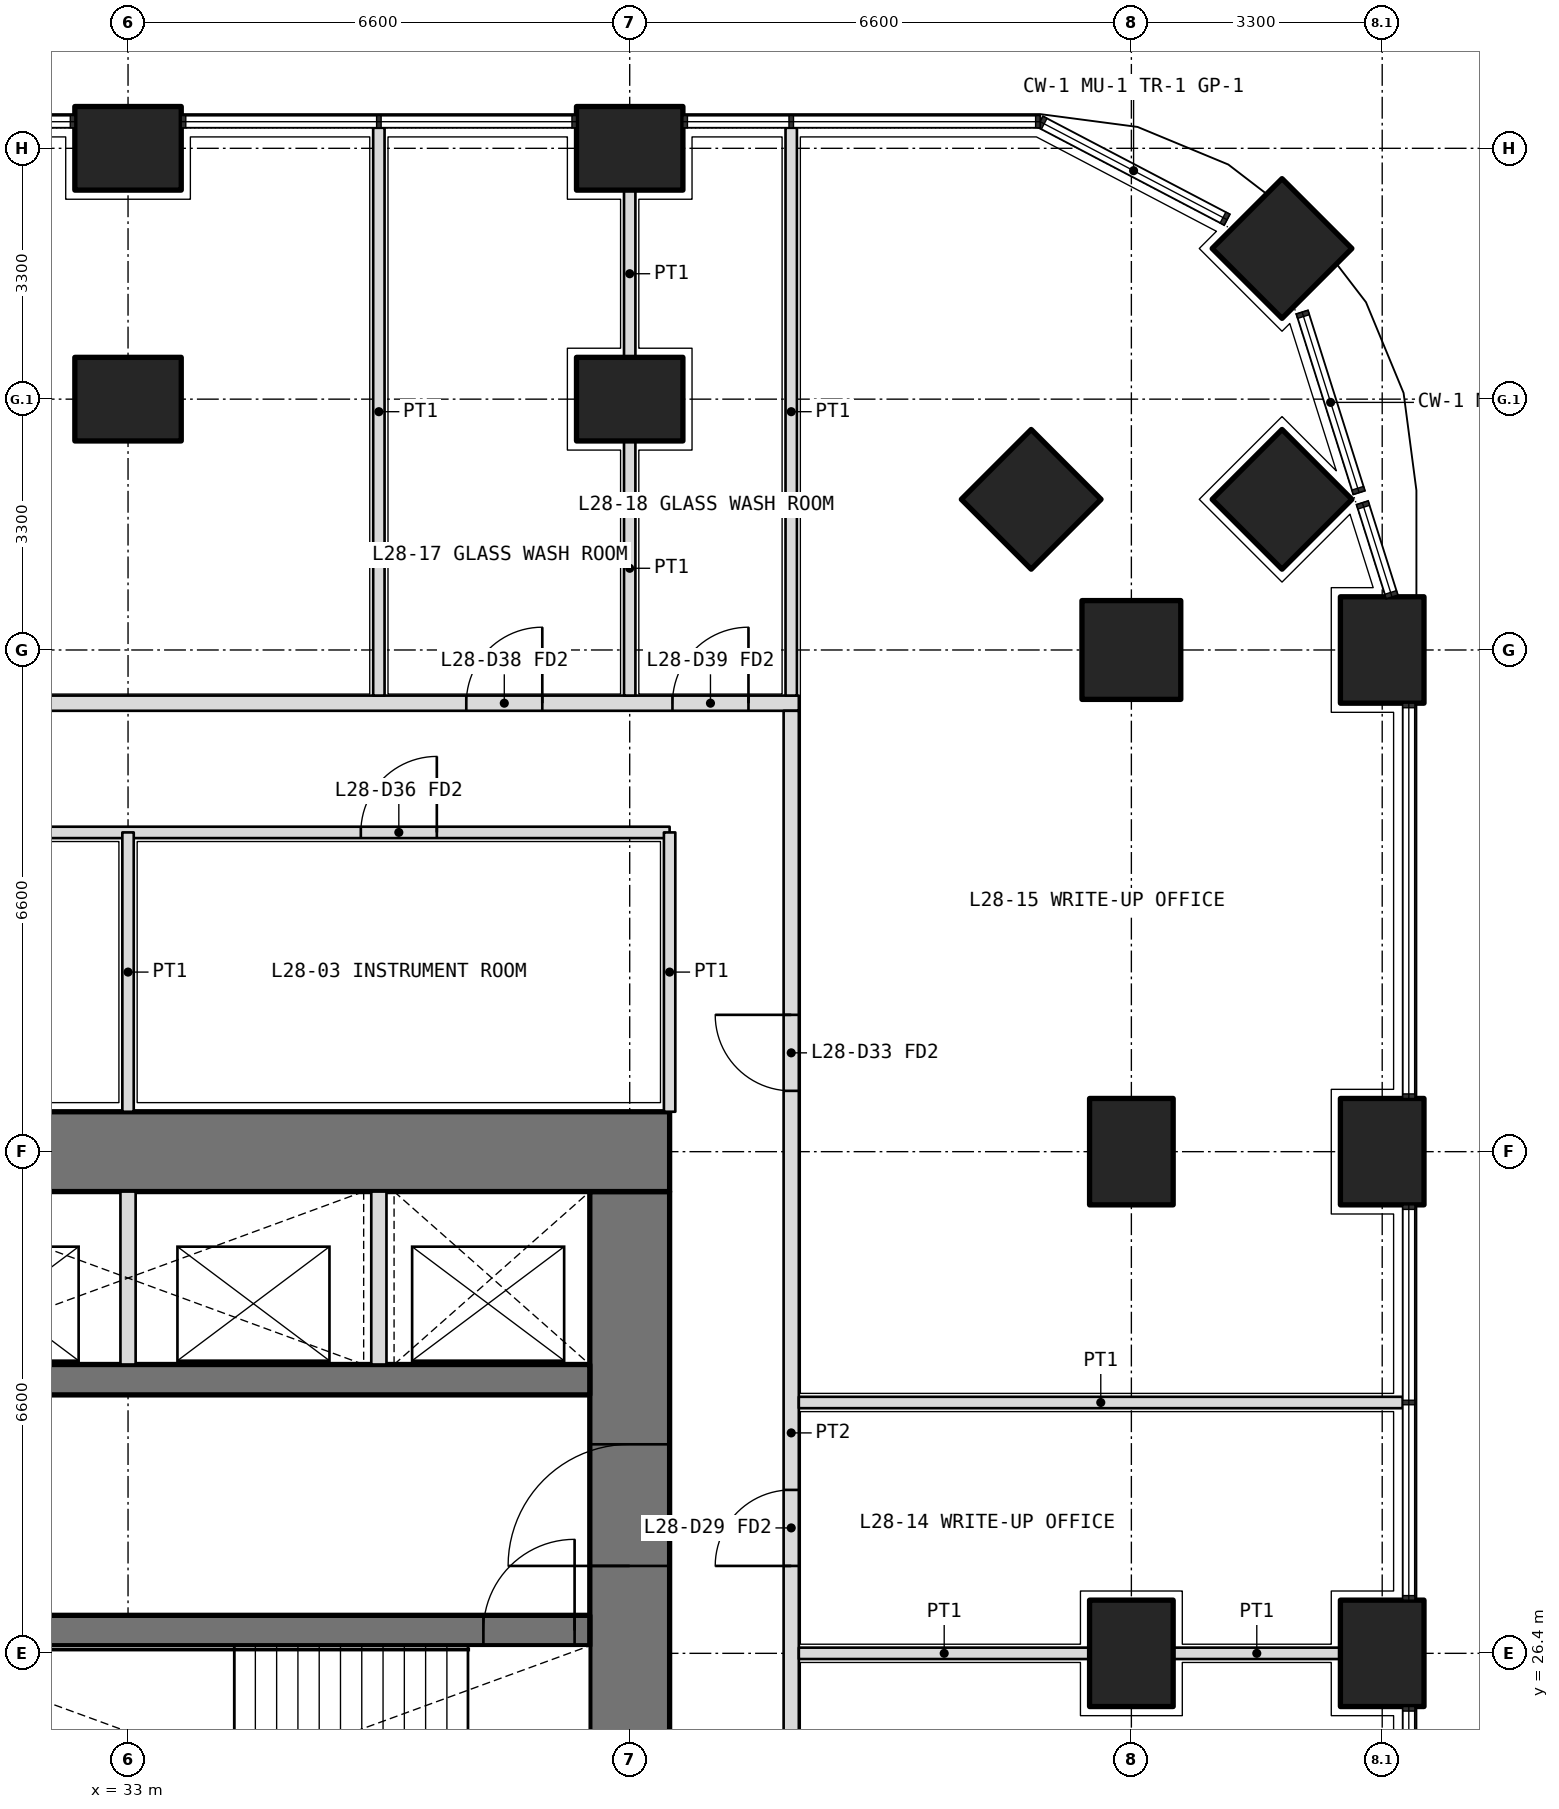
"""IFC4 building model, lengths in metres.
Left out: names, types, materials, properties, quantities, classifications, styles, units other than length and angle.
Written with IfcOpenShell. Run it as: python <this file> out.ifc"""

import sys

from ifc_helpers import new_model, si_unit, direction, frame, frame_2d, origin, origin_2d, place, context, subcontext, project, spatial, rectangle, extrude, element, fill, save


model = new_model("IFC4")
c1 = context("Model", 3, precision=1e-05, world=origin(), true_north=direction((0.0, 1.0)))
c2 = subcontext(c1, "Body", "Model", "MODEL_VIEW")
j1 = project(units=[si_unit("LENGTHUNIT", "METRE"), si_unit("PLANEANGLEUNIT", "RADIAN")], contexts=[c1])
p1 = place(None, origin())
s1 = spatial("IfcSite", under=j1, at=p1, CompositionType="ELEMENT")
p2 = place(p1, origin())
s2 = spatial("IfcBuilding", under=s1, at=p2, CompositionType="ELEMENT")
p3 = place(p2, frame((0.0, 0.0, 124.2)))
s3 = spatial("IfcBuildingStorey", under=s2, at=p3, CompositionType="ELEMENT", Elevation=124.2)
p4 = place(p3, frame((48.182, 44.882, 0.0), z_axis=(0.0, 0.0, 1.0), x_axis=(0.707106781187, 0.707106781187, 0.0)))
e1 = element("IfcColumn", 1, at=p4, inside=s3, PredefinedType="COLUMN", context=c2, shape_type="SweptSolid", body=[
    extrude(rectangle(XDim=1.3, YDim=1.3, at=origin_2d()), origin(), (0.0, 0.0, 1.0), 4.2),
])
for number, where, z_axis, x_axis in (
    (2, (49.5, 26.4, 0.0), (0.0, 0.0, 1.0), (0.0, 1.0, 0.0)),
    (3, (49.5, 33.0, 0.0), (0.0, 0.0, 1.0), (0.0, 1.0, 0.0)),
    (4, (49.5, 39.6, 0.0), (0.0, 0.0, 1.0), (0.0, 1.0, 0.0)),
    (5, (33.0, 46.2, 0.0), (0.0, 0.0, 1.0), (1.0, 0.0, 0.0)),
    (6, (39.6, 46.2, 0.0), (0.0, 0.0, 1.0), (1.0, 0.0, 0.0)),
):
    element("IfcColumn", number, at=place(p3, frame(where, z_axis=z_axis, x_axis=x_axis)), inside=s3, PredefinedType="COLUMN", context=c2, shape_type="SweptSolid", body=[
        extrude(rectangle(XDim=1.4, YDim=1.1, at=origin_2d()), origin(), (0.0, 0.0, 1.0), 4.2),
    ])
for number, where, z_axis, x_axis in (
    (7, (46.2, 39.6, 0.0), (0.0, 0.0, 1.0), (1.0, 0.0, 0.0)),
    (8, (48.182, 41.582, 0.0), (0.0, 0.0, 1.0), (0.707, 0.707, 0.0)),
):
    element("IfcColumn", number, at=place(p3, frame(where, z_axis=z_axis, x_axis=x_axis)), inside=s3, PredefinedType="COLUMN", context=c2, shape_type="SweptSolid", body=[
        extrude(rectangle(XDim=1.3, YDim=1.3, at=origin_2d()), origin(), (0.0, 0.0, 1.0), 4.2),
    ])
for number, where, z_axis, x_axis in (
    (9, (33.0, 42.9, 0.0), (0.0, 0.0, 1.0), (1.0, 0.0, 0.0)),
    (10, (39.6, 42.9, 0.0), (0.0, 0.0, 1.0), (1.0, 0.0, 0.0)),
):
    element("IfcColumn", number, at=place(p3, frame(where, z_axis=z_axis, x_axis=x_axis)), inside=s3, PredefinedType="COLUMN", context=c2, shape_type="SweptSolid", body=[
        extrude(rectangle(XDim=1.4, YDim=1.1, at=origin_2d()), origin(), (0.0, 0.0, 1.0), 4.2),
    ])
p5 = place(p3, frame((44.882, 41.582, 0.0), z_axis=(0.0, 0.0, 1.0), x_axis=(0.707106781187, 0.707106781187, 0.0)))
e11 = element("IfcColumn", 11, at=p5, inside=s3, PredefinedType="COLUMN", context=c2, shape_type="SweptSolid", body=[
    extrude(rectangle(XDim=1.3, YDim=1.3, at=origin_2d()), origin(), (0.0, 0.0, 1.0), 4.2),
])
for number, where, z_axis, x_axis in (
    (12, (46.2, 26.4, 0.0), (0.0, 0.0, 1.0), (0.0, 1.0, 0.0)),
    (13, (46.2, 33.0, 0.0), (0.0, 0.0, 1.0), (0.0, 1.0, 0.0)),
):
    element("IfcColumn", number, at=place(p3, frame(where, z_axis=z_axis, x_axis=x_axis)), inside=s3, PredefinedType="COLUMN", context=c2, shape_type="SweptSolid", body=[
        extrude(rectangle(XDim=1.4, YDim=1.1, at=origin_2d()), origin(), (0.0, 0.0, 1.0), 4.2),
    ])
p6 = place(p3, frame((39.6, 13.725, 0.0), z_axis=(0.0, 0.0, 1.0), x_axis=(0.0, 1.0, 0.0)))
e14 = element("IfcWall", 14, at=p6, inside=s3, PredefinedType="SHEAR", context=c2, shape_type="SweptSolid", body=[
    extrude(rectangle(XDim=18.75, YDim=1.05, at=frame_2d((9.375, 0.0))), origin(), (0.0, 0.0, 1.0), 4.2),
])
p7 = place(p6, frame((3.025, 0.0, 0.0)))
e15 = element("IfcOpeningElement", 15, at=p7, cuts=e14, PredefinedType="OPENING", context=c2, shape_type="SweptSolid", body=[
    extrude(rectangle(XDim=1.6, YDim=2.1, at=frame_2d((0.8, 1.05))), frame((0.0, 0.535, 0.0), z_axis=(0.0, -1.0, 0.0), x_axis=(1.0, 0.0, 0.0)), (0.0, 0.0, 1.0), 1.07),
])
p8 = place(p6, frame((13.825, 0.0, 0.0)))
e16 = element("IfcOpeningElement", 16, at=p8, cuts=e14, PredefinedType="OPENING", context=c2, shape_type="SweptSolid", body=[
    extrude(rectangle(XDim=1.6, YDim=2.1, at=frame_2d((0.8, 1.05))), frame((0.0, 0.535, 0.0), z_axis=(0.0, -1.0, 0.0), x_axis=(1.0, 0.0, 0.0)), (0.0, 0.0, 1.0), 1.07),
])
p9 = place(p3, frame((40.125, 33.0, 0.0), z_axis=(0.0, 0.0, 1.0), x_axis=(-1.0, 0.0, 0.0)))
e17 = element("IfcWall", 17, at=p9, inside=s3, PredefinedType="SHEAR", context=c2, shape_type="SweptSolid", body=[
    extrude(rectangle(XDim=27.45, YDim=1.05, at=frame_2d((13.725, 0.0))), origin(), (0.0, 0.0, 1.0), 4.2),
])
p10 = place(p3, frame((13.725, 26.7, 0.0), z_axis=(0.0, 0.0, 1.0), x_axis=(1.0, 0.0, 0.0)))
e18 = element("IfcWall", 18, at=p10, inside=s3, PredefinedType="SHEAR", context=c2, shape_type="SweptSolid", body=[
    extrude(rectangle(XDim=25.35, YDim=0.4, at=frame_2d((12.675, 0.0))), origin(), (0.0, 0.0, 1.0), 4.2),
])
p11 = place(p10, frame((23.95, 0.0, 0.0)))
e19 = element("IfcOpeningElement", 19, at=p11, cuts=e18, PredefinedType="OPENING", context=c2, shape_type="SweptSolid", body=[
    extrude(rectangle(XDim=1.2, YDim=2.1, at=frame_2d((0.6, 1.05))), frame((0.0, 0.21, 0.0), z_axis=(0.0, -1.0, 0.0), x_axis=(1.0, 0.0, 0.0)), (0.0, 0.0, 1.0), 0.42),
])
p12 = place(p10, frame((0.738, 0.0, 0.0)))
e20 = element("IfcOpeningElement", 20, at=p12, cuts=e18, PredefinedType="OPENING", context=c2, shape_type="SweptSolid", body=[
    extrude(rectangle(XDim=1.1, YDim=2.1, at=frame_2d((0.55, 1.05))), frame((0.0, 0.21, 0.0), z_axis=(0.0, -1.0, 0.0), x_axis=(1.0, 0.0, 0.0)), (0.0, 0.0, 1.0), 0.42),
])
p13 = place(p10, frame((3.925, 0.0, 0.0)))
e21 = element("IfcOpeningElement", 21, at=p13, cuts=e18, PredefinedType="OPENING", context=c2, shape_type="SweptSolid", body=[
    extrude(rectangle(XDim=1.1, YDim=2.1, at=frame_2d((0.55, 1.05))), frame((0.0, 0.21, 0.0), z_axis=(0.0, -1.0, 0.0), x_axis=(1.0, 0.0, 0.0)), (0.0, 0.0, 1.0), 0.42),
])
p14 = place(p10, frame((7.175, 0.0, 0.0)))
e22 = element("IfcOpeningElement", 22, at=p14, cuts=e18, PredefinedType="OPENING", context=c2, shape_type="SweptSolid", body=[
    extrude(rectangle(XDim=1.1, YDim=2.1, at=frame_2d((0.55, 1.05))), frame((0.0, 0.21, 0.0), z_axis=(0.0, -1.0, 0.0), x_axis=(1.0, 0.0, 0.0)), (0.0, 0.0, 1.0), 0.42),
])
p15 = place(p10, frame((10.425, 0.0, 0.0)))
e23 = element("IfcOpeningElement", 23, at=p15, cuts=e18, PredefinedType="OPENING", context=c2, shape_type="SweptSolid", body=[
    extrude(rectangle(XDim=1.1, YDim=2.1, at=frame_2d((0.55, 1.05))), frame((0.0, 0.21, 0.0), z_axis=(0.0, -1.0, 0.0), x_axis=(1.0, 0.0, 0.0)), (0.0, 0.0, 1.0), 0.42),
])
p16 = place(p10, frame((13.775, 0.0, 0.0)))
e24 = element("IfcOpeningElement", 24, at=p16, cuts=e18, PredefinedType="OPENING", context=c2, shape_type="SweptSolid", body=[
    extrude(rectangle(XDim=1.1, YDim=2.1, at=frame_2d((0.55, 1.05))), frame((0.0, 0.21, 0.0), z_axis=(0.0, -1.0, 0.0), x_axis=(1.0, 0.0, 0.0)), (0.0, 0.0, 1.0), 0.42),
])
p17 = place(p3, frame((13.725, 30.0, 0.0), z_axis=(0.0, 0.0, 1.0), x_axis=(1.0, 0.0, 0.0)))
e25 = element("IfcWall", 25, at=p17, inside=s3, PredefinedType="SHEAR", context=c2, shape_type="SweptSolid", body=[
    extrude(rectangle(XDim=25.35, YDim=0.4, at=frame_2d((12.675, 0.0))), origin(), (0.0, 0.0, 1.0), 4.2),
])
for number, where, z_axis, x_axis in (
    (26, (33.0, 30.2, 0.0), (0.0, 0.0, 1.0), (0.0, 1.0, 0.0)),
    (27, (36.3, 30.2, 0.0), (0.0, 0.0, 1.0), (0.0, 1.0, 0.0)),
):
    element("IfcWall", number, at=place(p3, frame(where, z_axis=z_axis, x_axis=x_axis)), inside=s3, PredefinedType="PARTITIONING", context=c2, shape_type="SweptSolid", body=[
        extrude(rectangle(XDim=2.275, YDim=0.2, at=frame_2d((1.138, 0.0))), origin(), (0.0, 0.0, 1.0), 4.2),
    ])
p18 = place(p3, frame((12.675, 37.2, 0.0), z_axis=(0.0, 0.0, 1.0), x_axis=(1.0, 0.0, 0.0)))
e28 = element("IfcWall", 28, at=p18, inside=s3, PredefinedType="PARTITIONING", context=c2, shape_type="SweptSolid", body=[
    extrude(rectangle(XDim=27.45, YDim=0.15, at=frame_2d((13.725, 0.0))), origin(), (0.0, 0.0, 1.0), 2.85),
])
p19 = place(p18, frame((3.062, 0.0, 0.0)))
e29 = element("IfcOpeningElement", 29, at=p19, cuts=e28, PredefinedType="OPENING", context=c2, shape_type="SweptSolid", body=[
    extrude(rectangle(XDim=1.0, YDim=2.1, at=frame_2d((0.5, 1.05))), frame((0.0, 0.085, 0.0), z_axis=(0.0, -1.0, 0.0), x_axis=(1.0, 0.0, 0.0)), (0.0, 0.0, 1.0), 0.17),
])
p20 = place(p18, frame((13.225, 0.0, 0.0)))
e30 = element("IfcOpeningElement", 30, at=p20, cuts=e28, PredefinedType="OPENING", context=c2, shape_type="SweptSolid", body=[
    extrude(rectangle(XDim=1.0, YDim=2.1, at=frame_2d((0.5, 1.05))), frame((0.0, 0.085, 0.0), z_axis=(0.0, -1.0, 0.0), x_axis=(1.0, 0.0, 0.0)), (0.0, 0.0, 1.0), 0.17),
])
p21 = place(p18, frame((23.387, 0.0, 0.0)))
e31 = element("IfcOpeningElement", 31, at=p21, cuts=e28, PredefinedType="OPENING", context=c2, shape_type="SweptSolid", body=[
    extrude(rectangle(XDim=1.0, YDim=2.1, at=frame_2d((0.5, 1.05))), frame((0.0, 0.085, 0.0), z_axis=(0.0, -1.0, 0.0), x_axis=(1.0, 0.0, 0.0)), (0.0, 0.0, 1.0), 0.17),
])
for number, where, z_axis, x_axis in (
    (32, (40.125, 33.525, 0.0), (0.0, 0.0, 1.0), (0.0, 1.0, 0.0)),
    (33, (33.0, 33.525, 0.0), (0.0, 0.0, 1.0), (0.0, 1.0, 0.0)),
):
    element("IfcWall", number, at=place(p3, frame(where, z_axis=z_axis, x_axis=x_axis)), inside=s3, PredefinedType="PARTITIONING", context=c2, shape_type="SweptSolid", body=[
        extrude(rectangle(XDim=3.675, YDim=0.15, at=frame_2d((1.837, 0.0))), origin(), (0.0, 0.0, 1.0), 2.85),
    ])
p22 = place(p3, frame((10.975, 38.9, 0.0), z_axis=(0.0, 0.0, 1.0), x_axis=(1.0, 0.0, 0.0)))
e34 = element("IfcWall", 34, at=p22, inside=s3, PredefinedType="PARTITIONING", context=c2, shape_type="SweptSolid", body=[
    extrude(rectangle(XDim=30.85, YDim=0.2, at=frame_2d((15.425, 0.0))), origin(), (0.0, 0.0, 1.0), 2.85),
])
p23 = place(p22, frame((12.113, 0.0, 0.0)))
e35 = element("IfcOpeningElement", 35, at=p23, cuts=e34, PredefinedType="OPENING", context=c2, shape_type="SweptSolid", body=[
    extrude(rectangle(XDim=1.2, YDim=2.1, at=frame_2d((0.6, 1.05))), frame((0.0, 0.11, 0.0), z_axis=(0.0, -1.0, 0.0), x_axis=(1.0, 0.0, 0.0)), (0.0, 0.0, 1.0), 0.22),
])
p24 = place(p22, frame((26.475, 0.0, 0.0)))
e36 = element("IfcOpeningElement", 36, at=p24, cuts=e34, PredefinedType="OPENING", context=c2, shape_type="SweptSolid", body=[
    extrude(rectangle(XDim=1.0, YDim=2.1, at=frame_2d((0.5, 1.05))), frame((0.0, 0.11, 0.0), z_axis=(0.0, -1.0, 0.0), x_axis=(1.0, 0.0, 0.0)), (0.0, 0.0, 1.0), 0.22),
])
p25 = place(p22, frame((29.188, 0.0, 0.0)))
e37 = element("IfcOpeningElement", 37, at=p25, cuts=e34, PredefinedType="OPENING", context=c2, shape_type="SweptSolid", body=[
    extrude(rectangle(XDim=1.0, YDim=2.1, at=frame_2d((0.5, 1.05))), frame((0.0, 0.11, 0.0), z_axis=(0.0, -1.0, 0.0), x_axis=(1.0, 0.0, 0.0)), (0.0, 0.0, 1.0), 0.22),
])
p26 = place(p3, frame((41.725, 19.8, 0.0), z_axis=(0.0, 0.0, 1.0), x_axis=(0.0, 1.0, 0.0)))
e38 = element("IfcWall", 38, at=p26, inside=s3, PredefinedType="PARTITIONING", context=c2, shape_type="SweptSolid", body=[
    extrude(rectangle(XDim=19.0, YDim=0.2, at=frame_2d((9.5, 0.0))), origin(), (0.0, 0.0, 1.0), 2.85),
])
p27 = place(p26, frame((1.0, 0.0, 0.0)))
e39 = element("IfcOpeningElement", 39, at=p27, cuts=e38, PredefinedType="OPENING", context=c2, shape_type="SweptSolid", body=[
    extrude(rectangle(XDim=1.0, YDim=2.1, at=frame_2d((0.5, 1.05))), frame((0.0, 0.11, 0.0), z_axis=(0.0, -1.0, 0.0), x_axis=(1.0, 0.0, 0.0)), (0.0, 0.0, 1.0), 0.22),
])
p28 = place(p26, frame((4.35, 0.0, 0.0)))
e40 = element("IfcOpeningElement", 40, at=p28, cuts=e38, PredefinedType="OPENING", context=c2, shape_type="SweptSolid", body=[
    extrude(rectangle(XDim=0.9, YDim=2.1, at=frame_2d((0.45, 1.05))), frame((0.0, 0.11, 0.0), z_axis=(0.0, -1.0, 0.0), x_axis=(1.0, 0.0, 0.0)), (0.0, 0.0, 1.0), 0.22),
])
p29 = place(p26, frame((7.75, 0.0, 0.0)))
e41 = element("IfcOpeningElement", 41, at=p29, cuts=e38, PredefinedType="OPENING", context=c2, shape_type="SweptSolid", body=[
    extrude(rectangle(XDim=1.0, YDim=2.1, at=frame_2d((0.5, 1.05))), frame((0.0, 0.11, 0.0), z_axis=(0.0, -1.0, 0.0), x_axis=(1.0, 0.0, 0.0)), (0.0, 0.0, 1.0), 0.22),
])
p30 = place(p26, frame((14.0, 0.0, 0.0)))
e42 = element("IfcOpeningElement", 42, at=p30, cuts=e38, PredefinedType="OPENING", context=c2, shape_type="SweptSolid", body=[
    extrude(rectangle(XDim=1.0, YDim=2.1, at=frame_2d((0.5, 1.05))), frame((0.0, 0.11, 0.0), z_axis=(0.0, -1.0, 0.0), x_axis=(1.0, 0.0, 0.0)), (0.0, 0.0, 1.0), 0.22),
])
p31 = place(p3, frame((41.725, 46.47, 0.0), z_axis=(0.0, 0.0, 1.0), x_axis=(0.0, -1.0, 0.0)))
e43 = element("IfcWall", 43, at=p31, inside=s3, PredefinedType="PARTITIONING", context=c2, shape_type="SweptSolid", body=[
    extrude(rectangle(XDim=7.47, YDim=0.15, at=frame_2d((3.735, 0.0))), origin(), (0.0, 0.0, 1.0), 2.7),
])
p32 = place(p3, frame((48.95, 26.4, 0.0), z_axis=(0.0, 0.0, 1.0), x_axis=(-1.0, 0.0, 0.0)))
e44 = element("IfcWall", 44, at=p32, inside=s3, PredefinedType="PARTITIONING", context=c2, shape_type="SweptSolid", body=[
    extrude(rectangle(XDim=2.2, YDim=0.15, at=frame_2d((1.1, 0.0))), origin(), (0.0, 0.0, 1.0), 2.85),
])
p33 = place(p3, frame((45.65, 26.4, 0.0), z_axis=(0.0, 0.0, 1.0), x_axis=(-1.0, 0.0, 0.0)))
e45 = element("IfcWall", 45, at=p33, inside=s3, PredefinedType="PARTITIONING", context=c2, shape_type="SweptSolid", body=[
    extrude(rectangle(XDim=3.825, YDim=0.15, at=frame_2d((1.913, 0.0))), origin(), (0.0, 0.0, 1.0), 2.85),
])
p34 = place(p3, frame((49.77, 29.7, 0.0), z_axis=(0.0, 0.0, 1.0), x_axis=(-1.0, 0.0, 0.0)))
e46 = element("IfcWall", 46, at=p34, inside=s3, PredefinedType="PARTITIONING", context=c2, shape_type="SweptSolid", body=[
    extrude(rectangle(XDim=7.945, YDim=0.15, at=frame_2d((3.973, 0.0))), origin(), (0.0, 0.0, 1.0), 2.7),
])
p35 = place(p3, frame((36.3, 46.47, 0.0), z_axis=(0.0, 0.0, 1.0), x_axis=(0.0, -1.0, 0.0)))
e47 = element("IfcWall", 47, at=p35, inside=s3, PredefinedType="PARTITIONING", context=c2, shape_type="SweptSolid", body=[
    extrude(rectangle(XDim=7.47, YDim=0.15, at=frame_2d((3.735, 0.0))), origin(), (0.0, 0.0, 1.0), 2.7),
])
p36 = place(p3, frame((39.6, 45.65, 0.0), z_axis=(0.0, 0.0, 1.0), x_axis=(0.0, -1.0, 0.0)))
e48 = element("IfcWall", 48, at=p36, inside=s3, PredefinedType="PARTITIONING", context=c2, shape_type="SweptSolid", body=[
    extrude(rectangle(XDim=2.2, YDim=0.15, at=frame_2d((1.1, 0.0))), origin(), (0.0, 0.0, 1.0), 2.85),
])
p37 = place(p3, frame((39.6, 42.35, 0.0), z_axis=(0.0, 0.0, 1.0), x_axis=(0.0, -1.0, 0.0)))
e49 = element("IfcWall", 49, at=p37, inside=s3, PredefinedType="PARTITIONING", context=c2, shape_type="SweptSolid", body=[
    extrude(rectangle(XDim=3.35, YDim=0.15, at=frame_2d((1.675, 0.0))), origin(), (0.0, 0.0, 1.0), 2.85),
])
p38 = place(p21, origin())
e50 = element("IfcDoor", 50, at=p38, inside=s3, OperationType="SINGLE_SWING_RIGHT", PredefinedType="DOOR", context=c2, shape_type="SweptSolid", body=[
    extrude(rectangle(XDim=1.0, YDim=2.1, at=frame_2d((0.5, 1.05))), frame((0.0, 0.025, 0.0), z_axis=(0.0, -1.0, 0.0), x_axis=(1.0, 0.0, 0.0)), (0.0, 0.0, 1.0), 0.05),
])
fill(e31, e50)
p39 = place(p29, origin())
e51 = element("IfcDoor", 51, at=p39, inside=s3, OperationType="SINGLE_SWING_LEFT", PredefinedType="DOOR", context=c2, shape_type="SweptSolid", body=[
    extrude(rectangle(XDim=1.0, YDim=2.1, at=frame_2d((0.5, 1.05))), frame((0.0, 0.025, 0.0), z_axis=(0.0, -1.0, 0.0), x_axis=(1.0, 0.0, 0.0)), (0.0, 0.0, 1.0), 0.05),
])
fill(e41, e51)
p40 = place(p30, origin())
e52 = element("IfcDoor", 52, at=p40, inside=s3, OperationType="SINGLE_SWING_RIGHT", PredefinedType="DOOR", context=c2, shape_type="SweptSolid", body=[
    extrude(rectangle(XDim=1.0, YDim=2.1, at=frame_2d((0.5, 1.05))), frame((0.0, 0.025, 0.0), z_axis=(0.0, -1.0, 0.0), x_axis=(1.0, 0.0, 0.0)), (0.0, 0.0, 1.0), 0.05),
])
fill(e42, e52)
p41 = place(p24, origin())
e53 = element("IfcDoor", 53, at=p41, inside=s3, OperationType="SINGLE_SWING_RIGHT", PredefinedType="DOOR", context=c2, shape_type="SweptSolid", body=[
    extrude(rectangle(XDim=1.0, YDim=2.1, at=frame_2d((0.5, 1.05))), frame((0.0, 0.025, 0.0), z_axis=(0.0, -1.0, 0.0), x_axis=(1.0, 0.0, 0.0)), (0.0, 0.0, 1.0), 0.05),
])
fill(e36, e53)
p42 = place(p25, origin())
e54 = element("IfcDoor", 54, at=p42, inside=s3, OperationType="SINGLE_SWING_RIGHT", PredefinedType="DOOR", context=c2, shape_type="SweptSolid", body=[
    extrude(rectangle(XDim=1.0, YDim=2.1, at=frame_2d((0.5, 1.05))), frame((0.0, 0.025, 0.0), z_axis=(0.0, -1.0, 0.0), x_axis=(1.0, 0.0, 0.0)), (0.0, 0.0, 1.0), 0.05),
])
fill(e37, e54)
p43 = place(p11, origin())
e55 = element("IfcDoor", 55, at=p43, inside=s3, OperationType="SINGLE_SWING_RIGHT", PredefinedType="DOOR", context=c2, shape_type="SweptSolid", body=[
    extrude(rectangle(XDim=1.2, YDim=2.1, at=frame_2d((0.6, 1.05))), frame((0.0, 0.025, 0.0), z_axis=(0.0, -1.0, 0.0), x_axis=(1.0, 0.0, 0.0)), (0.0, 0.0, 1.0), 0.05),
])
fill(e19, e55)
p44 = place(p8, origin())
e56 = element("IfcDoor", 56, at=p44, inside=s3, OperationType="DOUBLE_DOOR_DOUBLE_SWING", PredefinedType="DOOR", context=c2, shape_type="SweptSolid", body=[
    extrude(rectangle(XDim=1.6, YDim=2.1, at=frame_2d((0.8, 1.05))), frame((0.0, 0.025, 0.0), z_axis=(0.0, -1.0, 0.0), x_axis=(1.0, 0.0, 0.0)), (0.0, 0.0, 1.0), 0.05),
])
fill(e16, e56)
save(model, sys.argv[1])
